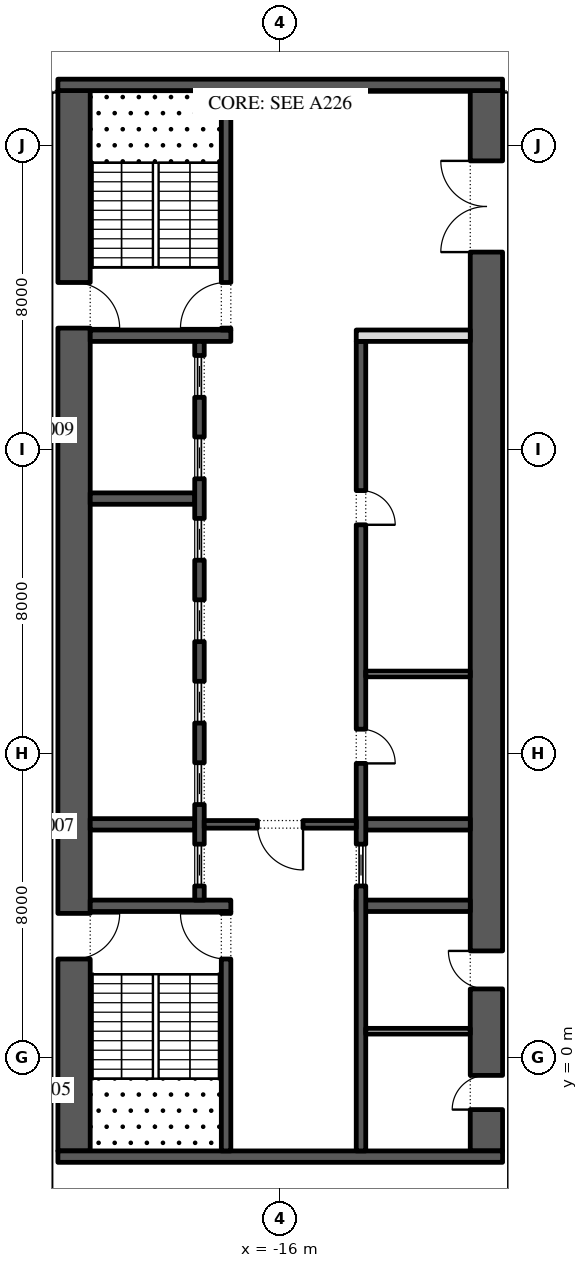
"""IFC4 building model, lengths in metres.
Left out: names, types, materials, properties, quantities, classifications, styles, units other than length and angle.
Written with IfcOpenShell. Run it as: python <this file> out.ifc"""

import sys

from ifc_helpers import new_model, si_unit, direction, frame, frame_2d, origin, place, context, subcontext, project, spatial, rectangle, extrude, element, fill, save


model = new_model("IFC4")
c1 = context("Model", 3, precision=1e-05, world=origin(), true_north=direction((0.0, 1.0)))
c2 = subcontext(c1, "Body", "Model", "MODEL_VIEW")
j1 = project(units=[si_unit("LENGTHUNIT", "METRE"), si_unit("PLANEANGLEUNIT", "RADIAN")], contexts=[c1])
p1 = place(None, origin())
s1 = spatial("IfcSite", under=j1, at=p1, CompositionType="ELEMENT")
p2 = place(p1, origin())
s2 = spatial("IfcBuilding", under=s1, at=p2, CompositionType="ELEMENT")
p3 = place(p2, frame((0.0, 0.0, 109.8)))
s3 = spatial("IfcBuildingStorey", under=s2, at=p3, CompositionType="ELEMENT", Elevation=109.8)
p4 = place(p3, frame((-21.425, -2.45, 0.0), z_axis=(0.0, 0.0, 1.0), x_axis=(0.0, 1.0, 0.0)))
e1 = element("IfcWall", 1, at=p4, inside=s3, PredefinedType="SHEAR", context=c2, shape_type="SweptSolid", body=[
    extrude(rectangle(XDim=27.9, YDim=0.85, at=frame_2d((13.95, 0.0))), origin(), (0.0, 0.0, 1.0), 4.0),
])
p5 = place(p4, frame((5.05, 0.0, 0.0)))
e2 = element("IfcOpeningElement", 2, at=p5, cuts=e1, PredefinedType="OPENING", context=c2, shape_type="SweptSolid", body=[
    extrude(rectangle(XDim=1.2, YDim=2.1, at=frame_2d((0.6, 1.05))), frame((0.0, 0.435, 0.0), z_axis=(0.0, -1.0, 0.0), x_axis=(1.0, 0.0, 0.0)), (0.0, 0.0, 1.0), 0.87),
])
p6 = place(p4, frame((21.65, 0.0, 0.0)))
e3 = element("IfcOpeningElement", 3, at=p6, cuts=e1, PredefinedType="OPENING", context=c2, shape_type="SweptSolid", body=[
    extrude(rectangle(XDim=1.2, YDim=2.1, at=frame_2d((0.6, 1.05))), frame((0.0, 0.435, 0.0), z_axis=(0.0, -1.0, 0.0), x_axis=(1.0, 0.0, 0.0)), (0.0, 0.0, 1.0), 0.87),
])
p7 = place(p3, frame((-10.575, -2.45, 0.0), z_axis=(0.0, 0.0, 1.0), x_axis=(0.0, 1.0, 0.0)))
e4 = element("IfcWall", 4, at=p7, inside=s3, PredefinedType="SHEAR", context=c2, shape_type="SweptSolid", body=[
    extrude(rectangle(XDim=27.9, YDim=0.85, at=frame_2d((13.95, 0.0))), origin(), (0.0, 0.0, 1.0), 4.0),
])
p8 = place(p7, frame((23.65, 0.0, 0.0)))
e5 = element("IfcOpeningElement", 5, at=p8, cuts=e4, PredefinedType="OPENING", context=c2, shape_type="SweptSolid", body=[
    extrude(rectangle(XDim=2.4, YDim=2.1, at=frame_2d((1.2, 1.05))), frame((0.0, 0.435, 0.0), z_axis=(0.0, -1.0, 0.0), x_axis=(1.0, 0.0, 0.0)), (0.0, 0.0, 1.0), 0.87),
])
p9 = place(p7, frame((1.087, 0.0, 0.0)))
e6 = element("IfcOpeningElement", 6, at=p9, cuts=e4, PredefinedType="OPENING", context=c2, shape_type="SweptSolid", body=[
    extrude(rectangle(XDim=0.9, YDim=2.1, at=frame_2d((0.45, 1.05))), frame((0.0, 0.435, 0.0), z_axis=(0.0, -1.0, 0.0), x_axis=(1.0, 0.0, 0.0)), (0.0, 0.0, 1.0), 0.87),
])
p10 = place(p7, frame((4.262, 0.0, 0.0)))
e7 = element("IfcOpeningElement", 7, at=p10, cuts=e4, PredefinedType="OPENING", context=c2, shape_type="SweptSolid", body=[
    extrude(rectangle(XDim=1.0, YDim=2.1, at=frame_2d((0.5, 1.05))), frame((0.0, 0.435, 0.0), z_axis=(0.0, -1.0, 0.0), x_axis=(1.0, 0.0, 0.0)), (0.0, 0.0, 1.0), 0.87),
])
for number, where, z_axis, x_axis in (
    (8, (-21.85, -2.6, 0.0), (0.0, 0.0, 1.0), (1.0, 0.0, 0.0)),
    (9, (-21.85, 25.6, 0.0), (0.0, 0.0, 1.0), (1.0, 0.0, 0.0)),
):
    element("IfcWall", number, at=place(p3, frame(where, z_axis=z_axis, x_axis=x_axis)), inside=s3, PredefinedType="SHEAR", context=c2, shape_type="SweptSolid", body=[
        extrude(rectangle(XDim=11.7, YDim=0.3, at=frame_2d((5.85, 0.0))), origin(), (0.0, 0.0, 1.0), 4.0),
    ])
p11 = place(p3, frame((-21.0, 4.0, 0.0), z_axis=(0.0, 0.0, 1.0), x_axis=(1.0, 0.0, 0.0)))
e10 = element("IfcWall", 10, at=p11, inside=s3, PredefinedType="SHEAR", context=c2, shape_type="SweptSolid", body=[
    extrude(rectangle(XDim=3.7, YDim=0.3, at=frame_2d((1.85, 0.0))), origin(), (0.0, 0.0, 1.0), 4.0),
])
p12 = place(p3, frame((-17.425, -2.45, 0.0), z_axis=(0.0, 0.0, 1.0), x_axis=(0.0, 1.0, 0.0)))
e11 = element("IfcWall", 11, at=p12, inside=s3, PredefinedType="SHEAR", context=c2, shape_type="SweptSolid", body=[
    extrude(rectangle(XDim=6.3, YDim=0.25, at=frame_2d((3.15, 0.0))), origin(), (0.0, 0.0, 1.0), 4.0),
])
p13 = place(p12, frame((5.05, 0.0, 0.0)))
e12 = element("IfcOpeningElement", 12, at=p13, cuts=e11, PredefinedType="OPENING", context=c2, shape_type="SweptSolid", body=[
    extrude(rectangle(XDim=1.2, YDim=2.1, at=frame_2d((0.6, 1.05))), frame((0.0, 0.135, 0.0), z_axis=(0.0, -1.0, 0.0), x_axis=(1.0, 0.0, 0.0)), (0.0, 0.0, 1.0), 0.27),
])
p14 = place(p3, frame((-21.0, 19.0, 0.0), z_axis=(0.0, 0.0, 1.0), x_axis=(1.0, 0.0, 0.0)))
e13 = element("IfcWall", 13, at=p14, inside=s3, PredefinedType="SHEAR", context=c2, shape_type="SweptSolid", body=[
    extrude(rectangle(XDim=3.7, YDim=0.3, at=frame_2d((1.85, 0.0))), origin(), (0.0, 0.0, 1.0), 4.0),
])
p15 = place(p3, frame((-17.425, 19.15, 0.0), z_axis=(0.0, 0.0, 1.0), x_axis=(0.0, 1.0, 0.0)))
e14 = element("IfcWall", 14, at=p15, inside=s3, PredefinedType="SHEAR", context=c2, shape_type="SweptSolid", body=[
    extrude(rectangle(XDim=6.3, YDim=0.25, at=frame_2d((3.15, 0.0))), origin(), (0.0, 0.0, 1.0), 4.0),
])
p16 = place(p15, frame((0.05, 0.0, 0.0)))
e15 = element("IfcOpeningElement", 15, at=p16, cuts=e14, PredefinedType="OPENING", context=c2, shape_type="SweptSolid", body=[
    extrude(rectangle(XDim=1.2, YDim=2.1, at=frame_2d((0.6, 1.05))), frame((0.0, 0.135, 0.0), z_axis=(0.0, -1.0, 0.0), x_axis=(1.0, 0.0, 0.0)), (0.0, 0.0, 1.0), 0.27),
])
for number, where, z_axis, x_axis in (
    (16, (-21.0, 6.143, 0.0), (0.0, 0.0, 1.0), (1.0, 0.0, 0.0)),
    (17, (-21.0, 14.714, 0.0), (0.0, 0.0, 1.0), (1.0, 0.0, 0.0)),
):
    element("IfcWall", number, at=place(p3, frame(where, z_axis=z_axis, x_axis=x_axis)), inside=s3, PredefinedType="SHEAR", context=c2, shape_type="SweptSolid", body=[
        extrude(rectangle(XDim=2.75, YDim=0.3, at=frame_2d((1.375, 0.0))), origin(), (0.0, 0.0, 1.0), 4.0),
    ])
p17 = place(p3, frame((-18.125, 4.15, 0.0), z_axis=(0.0, 0.0, 1.0), x_axis=(0.0, 1.0, 0.0)))
e18 = element("IfcWall", 18, at=p17, inside=s3, PredefinedType="SHEAR", context=c2, shape_type="SweptSolid", body=[
    extrude(rectangle(XDim=14.7, YDim=0.25, at=frame_2d((7.35, 0.0))), origin(), (0.0, 0.0, 1.0), 4.0),
])
p18 = place(p17, frame((0.371, 0.0, 0.0)))
e19 = element("IfcOpeningElement", 19, at=p18, cuts=e18, PredefinedType="OPENING", context=c2, shape_type="SweptSolid", body=[
    extrude(rectangle(XDim=1.1, YDim=2.1, at=frame_2d((0.55, 1.05))), frame((0.0, 0.135, 0.0), z_axis=(0.0, -1.0, 0.0), x_axis=(1.0, 0.0, 0.0)), (0.0, 0.0, 1.0), 0.27),
])
p19 = place(p17, frame((2.514, 0.0, 0.0)))
e20 = element("IfcOpeningElement", 20, at=p19, cuts=e18, PredefinedType="OPENING", context=c2, shape_type="SweptSolid", body=[
    extrude(rectangle(XDim=1.1, YDim=2.1, at=frame_2d((0.55, 1.05))), frame((0.0, 0.135, 0.0), z_axis=(0.0, -1.0, 0.0), x_axis=(1.0, 0.0, 0.0)), (0.0, 0.0, 1.0), 0.27),
])
p20 = place(p17, frame((4.657, 0.0, 0.0)))
e21 = element("IfcOpeningElement", 21, at=p20, cuts=e18, PredefinedType="OPENING", context=c2, shape_type="SweptSolid", body=[
    extrude(rectangle(XDim=1.1, YDim=2.1, at=frame_2d((0.55, 1.05))), frame((0.0, 0.135, 0.0), z_axis=(0.0, -1.0, 0.0), x_axis=(1.0, 0.0, 0.0)), (0.0, 0.0, 1.0), 0.27),
])
p21 = place(p17, frame((6.8, 0.0, 0.0)))
e22 = element("IfcOpeningElement", 22, at=p21, cuts=e18, PredefinedType="OPENING", context=c2, shape_type="SweptSolid", body=[
    extrude(rectangle(XDim=1.1, YDim=2.1, at=frame_2d((0.55, 1.05))), frame((0.0, 0.135, 0.0), z_axis=(0.0, -1.0, 0.0), x_axis=(1.0, 0.0, 0.0)), (0.0, 0.0, 1.0), 0.27),
])
p22 = place(p17, frame((8.943, 0.0, 0.0)))
e23 = element("IfcOpeningElement", 23, at=p22, cuts=e18, PredefinedType="OPENING", context=c2, shape_type="SweptSolid", body=[
    extrude(rectangle(XDim=1.1, YDim=2.1, at=frame_2d((0.55, 1.05))), frame((0.0, 0.135, 0.0), z_axis=(0.0, -1.0, 0.0), x_axis=(1.0, 0.0, 0.0)), (0.0, 0.0, 1.0), 0.27),
])
p23 = place(p17, frame((11.086, 0.0, 0.0)))
e24 = element("IfcOpeningElement", 24, at=p23, cuts=e18, PredefinedType="OPENING", context=c2, shape_type="SweptSolid", body=[
    extrude(rectangle(XDim=1.1, YDim=2.1, at=frame_2d((0.55, 1.05))), frame((0.0, 0.135, 0.0), z_axis=(0.0, -1.0, 0.0), x_axis=(1.0, 0.0, 0.0)), (0.0, 0.0, 1.0), 0.27),
])
p24 = place(p17, frame((13.229, 0.0, 0.0)))
e25 = element("IfcOpeningElement", 25, at=p24, cuts=e18, PredefinedType="OPENING", context=c2, shape_type="SweptSolid", body=[
    extrude(rectangle(XDim=1.1, YDim=2.1, at=frame_2d((0.55, 1.05))), frame((0.0, 0.135, 0.0), z_axis=(0.0, -1.0, 0.0), x_axis=(1.0, 0.0, 0.0)), (0.0, 0.0, 1.0), 0.27),
])
p25 = place(p3, frame((-14.0, 4.0, 0.0), z_axis=(0.0, 0.0, 1.0), x_axis=(1.0, 0.0, 0.0)))
e26 = element("IfcWall", 26, at=p25, inside=s3, PredefinedType="SHEAR", context=c2, shape_type="SweptSolid", body=[
    extrude(rectangle(XDim=3.0, YDim=0.3, at=frame_2d((1.5, 0.0))), origin(), (0.0, 0.0, 1.0), 4.0),
])
p26 = place(p3, frame((-13.75, 6.143, 0.0), z_axis=(0.0, 0.0, 1.0), x_axis=(1.0, 0.0, 0.0)))
e27 = element("IfcWall", 27, at=p26, inside=s3, PredefinedType="SHEAR", context=c2, shape_type="SweptSolid", body=[
    extrude(rectangle(XDim=2.75, YDim=0.3, at=frame_2d((1.375, 0.0))), origin(), (0.0, 0.0, 1.0), 4.0),
])
p27 = place(p3, frame((-13.875, -2.45, 0.0), z_axis=(0.0, 0.0, 1.0), x_axis=(0.0, 1.0, 0.0)))
e28 = element("IfcWall", 28, at=p27, inside=s3, PredefinedType="SHEAR", context=c2, shape_type="SweptSolid", body=[
    extrude(rectangle(XDim=21.3, YDim=0.25, at=frame_2d((10.65, 0.0))), origin(), (0.0, 0.0, 1.0), 4.0),
])
p28 = place(p27, frame((10.196, 0.0, 0.0)))
e29 = element("IfcOpeningElement", 29, at=p28, cuts=e28, PredefinedType="OPENING", context=c2, shape_type="SweptSolid", body=[
    extrude(rectangle(XDim=0.9, YDim=2.1, at=frame_2d((0.45, 1.05))), frame((0.0, 0.135, 0.0), z_axis=(0.0, -1.0, 0.0), x_axis=(1.0, 0.0, 0.0)), (0.0, 0.0, 1.0), 0.27),
])
p29 = place(p27, frame((16.475, 0.0, 0.0)))
e30 = element("IfcOpeningElement", 30, at=p29, cuts=e28, PredefinedType="OPENING", context=c2, shape_type="SweptSolid", body=[
    extrude(rectangle(XDim=0.9, YDim=2.1, at=frame_2d((0.45, 1.05))), frame((0.0, 0.135, 0.0), z_axis=(0.0, -1.0, 0.0), x_axis=(1.0, 0.0, 0.0)), (0.0, 0.0, 1.0), 0.27),
])
p30 = place(p27, frame((6.971, 0.0, 0.0)))
e31 = element("IfcOpeningElement", 31, at=p30, cuts=e28, PredefinedType="OPENING", context=c2, shape_type="SweptSolid", body=[
    extrude(rectangle(XDim=1.1, YDim=2.1, at=frame_2d((0.55, 1.05))), frame((0.0, 0.135, 0.0), z_axis=(0.0, -1.0, 0.0), x_axis=(1.0, 0.0, 0.0)), (0.0, 0.0, 1.0), 0.27),
])
p31 = place(p3, frame((-14.0, 19.0, 0.0), z_axis=(0.0, 0.0, 1.0), x_axis=(1.0, 0.0, 0.0)))
e32 = element("IfcWall", 32, at=p31, inside=s3, PredefinedType="PARTITIONING", context=c2, shape_type="SweptSolid", body=[
    extrude(rectangle(XDim=3.0, YDim=0.3, at=frame_2d((1.5, 0.0))), origin(), (0.0, 0.0, 1.0), 4.0),
])
p32 = place(p3, frame((-13.75, 10.1, 0.0), z_axis=(0.0, 0.0, 1.0), x_axis=(1.0, 0.0, 0.0)))
e33 = element("IfcWall", 33, at=p32, inside=s3, PredefinedType="PARTITIONING", context=c2, shape_type="SweptSolid", body=[
    extrude(rectangle(XDim=2.75, YDim=0.15, at=frame_2d((1.375, 0.0))), origin(), (0.0, 0.0, 1.0), 4.0),
])
p33 = place(p3, frame((-18.0, 6.143, 0.0), z_axis=(0.0, 0.0, 1.0), x_axis=(1.0, 0.0, 0.0)))
e34 = element("IfcWall", 34, at=p33, inside=s3, PredefinedType="SHEAR", context=c2, shape_type="SweptSolid", body=[
    extrude(rectangle(XDim=4.0, YDim=0.2, at=frame_2d((2.0, 0.0))), origin(), (0.0, 0.0, 1.0), 4.0),
])
p34 = place(p33, frame((1.4, 0.0, 0.0)))
e35 = element("IfcOpeningElement", 35, at=p34, cuts=e34, PredefinedType="OPENING", context=c2, shape_type="SweptSolid", body=[
    extrude(rectangle(XDim=1.2, YDim=2.1, at=frame_2d((0.6, 1.05))), frame((0.0, 0.11, 0.0), z_axis=(0.0, -1.0, 0.0), x_axis=(1.0, 0.0, 0.0)), (0.0, 0.0, 1.0), 0.22),
])
p35 = place(p3, frame((-13.75, 0.7, 0.0), z_axis=(0.0, 0.0, 1.0), x_axis=(1.0, 0.0, 0.0)))
e36 = element("IfcWall", 36, at=p35, inside=s3, PredefinedType="PARTITIONING", context=c2, shape_type="SweptSolid", body=[
    extrude(rectangle(XDim=2.75, YDim=0.15, at=frame_2d((1.375, 0.0))), origin(), (0.0, 0.0, 1.0), 4.0),
])
p36 = place(p18, origin())
e37 = element("IfcDoor", 37, at=p36, inside=s3, OperationType="SLIDING_TO_LEFT", PredefinedType="DOOR", context=c2, shape_type="SweptSolid", body=[
    extrude(rectangle(XDim=1.1, YDim=2.1, at=frame_2d((0.55, 1.05))), frame((0.0, 0.025, 0.0), z_axis=(0.0, -1.0, 0.0), x_axis=(1.0, 0.0, 0.0)), (0.0, 0.0, 1.0), 0.05),
])
fill(e19, e37)
p37 = place(p19, origin())
e38 = element("IfcDoor", 38, at=p37, inside=s3, OperationType="SLIDING_TO_LEFT", PredefinedType="DOOR", context=c2, shape_type="SweptSolid", body=[
    extrude(rectangle(XDim=1.1, YDim=2.1, at=frame_2d((0.55, 1.05))), frame((0.0, 0.025, 0.0), z_axis=(0.0, -1.0, 0.0), x_axis=(1.0, 0.0, 0.0)), (0.0, 0.0, 1.0), 0.05),
])
fill(e20, e38)
p38 = place(p20, origin())
e39 = element("IfcDoor", 39, at=p38, inside=s3, OperationType="SLIDING_TO_LEFT", PredefinedType="DOOR", context=c2, shape_type="SweptSolid", body=[
    extrude(rectangle(XDim=1.1, YDim=2.1, at=frame_2d((0.55, 1.05))), frame((0.0, 0.025, 0.0), z_axis=(0.0, -1.0, 0.0), x_axis=(1.0, 0.0, 0.0)), (0.0, 0.0, 1.0), 0.05),
])
fill(e21, e39)
p39 = place(p21, origin())
e40 = element("IfcDoor", 40, at=p39, inside=s3, OperationType="SLIDING_TO_LEFT", PredefinedType="DOOR", context=c2, shape_type="SweptSolid", body=[
    extrude(rectangle(XDim=1.1, YDim=2.1, at=frame_2d((0.55, 1.05))), frame((0.0, 0.025, 0.0), z_axis=(0.0, -1.0, 0.0), x_axis=(1.0, 0.0, 0.0)), (0.0, 0.0, 1.0), 0.05),
])
fill(e22, e40)
p40 = place(p22, origin())
e41 = element("IfcDoor", 41, at=p40, inside=s3, OperationType="SLIDING_TO_LEFT", PredefinedType="DOOR", context=c2, shape_type="SweptSolid", body=[
    extrude(rectangle(XDim=1.1, YDim=2.1, at=frame_2d((0.55, 1.05))), frame((0.0, 0.025, 0.0), z_axis=(0.0, -1.0, 0.0), x_axis=(1.0, 0.0, 0.0)), (0.0, 0.0, 1.0), 0.05),
])
fill(e23, e41)
p41 = place(p23, origin())
e42 = element("IfcDoor", 42, at=p41, inside=s3, OperationType="SLIDING_TO_LEFT", PredefinedType="DOOR", context=c2, shape_type="SweptSolid", body=[
    extrude(rectangle(XDim=1.1, YDim=2.1, at=frame_2d((0.55, 1.05))), frame((0.0, 0.025, 0.0), z_axis=(0.0, -1.0, 0.0), x_axis=(1.0, 0.0, 0.0)), (0.0, 0.0, 1.0), 0.05),
])
fill(e24, e42)
p42 = place(p24, origin())
e43 = element("IfcDoor", 43, at=p42, inside=s3, OperationType="SLIDING_TO_LEFT", PredefinedType="DOOR", context=c2, shape_type="SweptSolid", body=[
    extrude(rectangle(XDim=1.1, YDim=2.1, at=frame_2d((0.55, 1.05))), frame((0.0, 0.025, 0.0), z_axis=(0.0, -1.0, 0.0), x_axis=(1.0, 0.0, 0.0)), (0.0, 0.0, 1.0), 0.05),
])
fill(e25, e43)
p43 = place(p28, frame((0.9, -0.2, 0.0), z_axis=(0.0, 0.0, 1.0), x_axis=(-1.0, 0.0, 0.0)))
e44 = element("IfcDoor", 44, at=p43, inside=s3, OperationType="SINGLE_SWING_LEFT", PredefinedType="DOOR", context=c2, shape_type="SweptSolid", body=[
    extrude(rectangle(XDim=0.9, YDim=2.1, at=frame_2d((0.45, 1.05))), frame((0.0, -0.075, 0.0), z_axis=(0.0, -1.0, 0.0), x_axis=(1.0, 0.0, 0.0)), (0.0, 0.0, 1.0), 0.05),
])
fill(e29, e44)
p44 = place(p29, frame((0.9, -0.2, 0.0), z_axis=(0.0, 0.0, 1.0), x_axis=(-1.0, 0.0, 0.0)))
e45 = element("IfcDoor", 45, at=p44, inside=s3, OperationType="SINGLE_SWING_LEFT", PredefinedType="DOOR", context=c2, shape_type="SweptSolid", body=[
    extrude(rectangle(XDim=0.9, YDim=2.1, at=frame_2d((0.45, 1.05))), frame((0.0, -0.075, 0.0), z_axis=(0.0, -1.0, 0.0), x_axis=(1.0, 0.0, 0.0)), (0.0, 0.0, 1.0), 0.05),
])
fill(e30, e45)
p45 = place(p30, origin())
e46 = element("IfcDoor", 46, at=p45, inside=s3, OperationType="SLIDING_TO_LEFT", PredefinedType="DOOR", context=c2, shape_type="SweptSolid", body=[
    extrude(rectangle(XDim=1.1, YDim=2.1, at=frame_2d((0.55, 1.05))), frame((0.0, 0.025, 0.0), z_axis=(0.0, -1.0, 0.0), x_axis=(1.0, 0.0, 0.0)), (0.0, 0.0, 1.0), 0.05),
])
fill(e31, e46)
p46 = place(p34, frame((1.2, 0.0, 0.0), z_axis=(0.0, 0.0, 1.0), x_axis=(-1.0, 0.0, 0.0)))
e47 = element("IfcDoor", 47, at=p46, inside=s3, OperationType="SINGLE_SWING_RIGHT", PredefinedType="DOOR", context=c2, shape_type="SweptSolid", body=[
    extrude(rectangle(XDim=1.2, YDim=2.1, at=frame_2d((0.6, 1.05))), frame((0.0, 0.025, 0.0), z_axis=(0.0, -1.0, 0.0), x_axis=(1.0, 0.0, 0.0)), (0.0, 0.0, 1.0), 0.05),
])
fill(e35, e47)
p47 = place(p8, origin())
e48 = element("IfcDoor", 48, at=p47, inside=s3, OperationType="DOUBLE_DOOR_SINGLE_SWING", PredefinedType="DOOR", context=c2, shape_type="SweptSolid", body=[
    extrude(rectangle(XDim=2.4, YDim=2.1, at=frame_2d((1.2, 1.05))), frame((0.0, 0.025, 0.0), z_axis=(0.0, -1.0, 0.0), x_axis=(1.0, 0.0, 0.0)), (0.0, 0.0, 1.0), 0.05),
])
fill(e5, e48)
p48 = place(p13, origin())
e49 = element("IfcDoor", 49, at=p48, inside=s3, OperationType="SINGLE_SWING_LEFT", PredefinedType="DOOR", context=c2, shape_type="SweptSolid", body=[
    extrude(rectangle(XDim=1.2, YDim=2.1, at=frame_2d((0.6, 1.05))), frame((0.0, 0.025, 0.0), z_axis=(0.0, -1.0, 0.0), x_axis=(1.0, 0.0, 0.0)), (0.0, 0.0, 1.0), 0.05),
])
fill(e12, e49)
p49 = place(p5, frame((1.2, 0.0, 0.0), z_axis=(0.0, 0.0, 1.0), x_axis=(-1.0, 0.0, 0.0)))
e50 = element("IfcDoor", 50, at=p49, inside=s3, OperationType="SINGLE_SWING_RIGHT", PredefinedType="DOOR", context=c2, shape_type="SweptSolid", body=[
    extrude(rectangle(XDim=1.2, YDim=2.1, at=frame_2d((0.6, 1.05))), frame((0.0, 0.025, 0.0), z_axis=(0.0, -1.0, 0.0), x_axis=(1.0, 0.0, 0.0)), (0.0, 0.0, 1.0), 0.05),
])
fill(e2, e50)
p50 = place(p16, origin())
e51 = element("IfcDoor", 51, at=p50, inside=s3, OperationType="SINGLE_SWING_RIGHT", PredefinedType="DOOR", context=c2, shape_type="SweptSolid", body=[
    extrude(rectangle(XDim=1.2, YDim=2.1, at=frame_2d((0.6, 1.05))), frame((0.0, 0.025, 0.0), z_axis=(0.0, -1.0, 0.0), x_axis=(1.0, 0.0, 0.0)), (0.0, 0.0, 1.0), 0.05),
])
fill(e15, e51)
p51 = place(p6, frame((1.2, 0.0, 0.0), z_axis=(0.0, 0.0, 1.0), x_axis=(-1.0, 0.0, 0.0)))
e52 = element("IfcDoor", 52, at=p51, inside=s3, OperationType="SINGLE_SWING_LEFT", PredefinedType="DOOR", context=c2, shape_type="SweptSolid", body=[
    extrude(rectangle(XDim=1.2, YDim=2.1, at=frame_2d((0.6, 1.05))), frame((0.0, 0.025, 0.0), z_axis=(0.0, -1.0, 0.0), x_axis=(1.0, 0.0, 0.0)), (0.0, 0.0, 1.0), 0.05),
])
fill(e3, e52)
p52 = place(p9, origin())
e53 = element("IfcDoor", 53, at=p52, inside=s3, OperationType="SINGLE_SWING_RIGHT", PredefinedType="DOOR", context=c2, shape_type="SweptSolid", body=[
    extrude(rectangle(XDim=0.9, YDim=2.1, at=frame_2d((0.45, 1.05))), frame((0.0, 0.425, 0.0), z_axis=(0.0, -1.0, 0.0), x_axis=(1.0, 0.0, 0.0)), (0.0, 0.0, 1.0), 0.05),
])
fill(e6, e53)
p53 = place(p10, origin())
e54 = element("IfcDoor", 54, at=p53, inside=s3, OperationType="SINGLE_SWING_LEFT", PredefinedType="DOOR", context=c2, shape_type="SweptSolid", body=[
    extrude(rectangle(XDim=1.0, YDim=2.1, at=frame_2d((0.5, 1.05))), frame((0.0, 0.425, 0.0), z_axis=(0.0, -1.0, 0.0), x_axis=(1.0, 0.0, 0.0)), (0.0, 0.0, 1.0), 0.05),
])
fill(e7, e54)
save(model, sys.argv[1])
